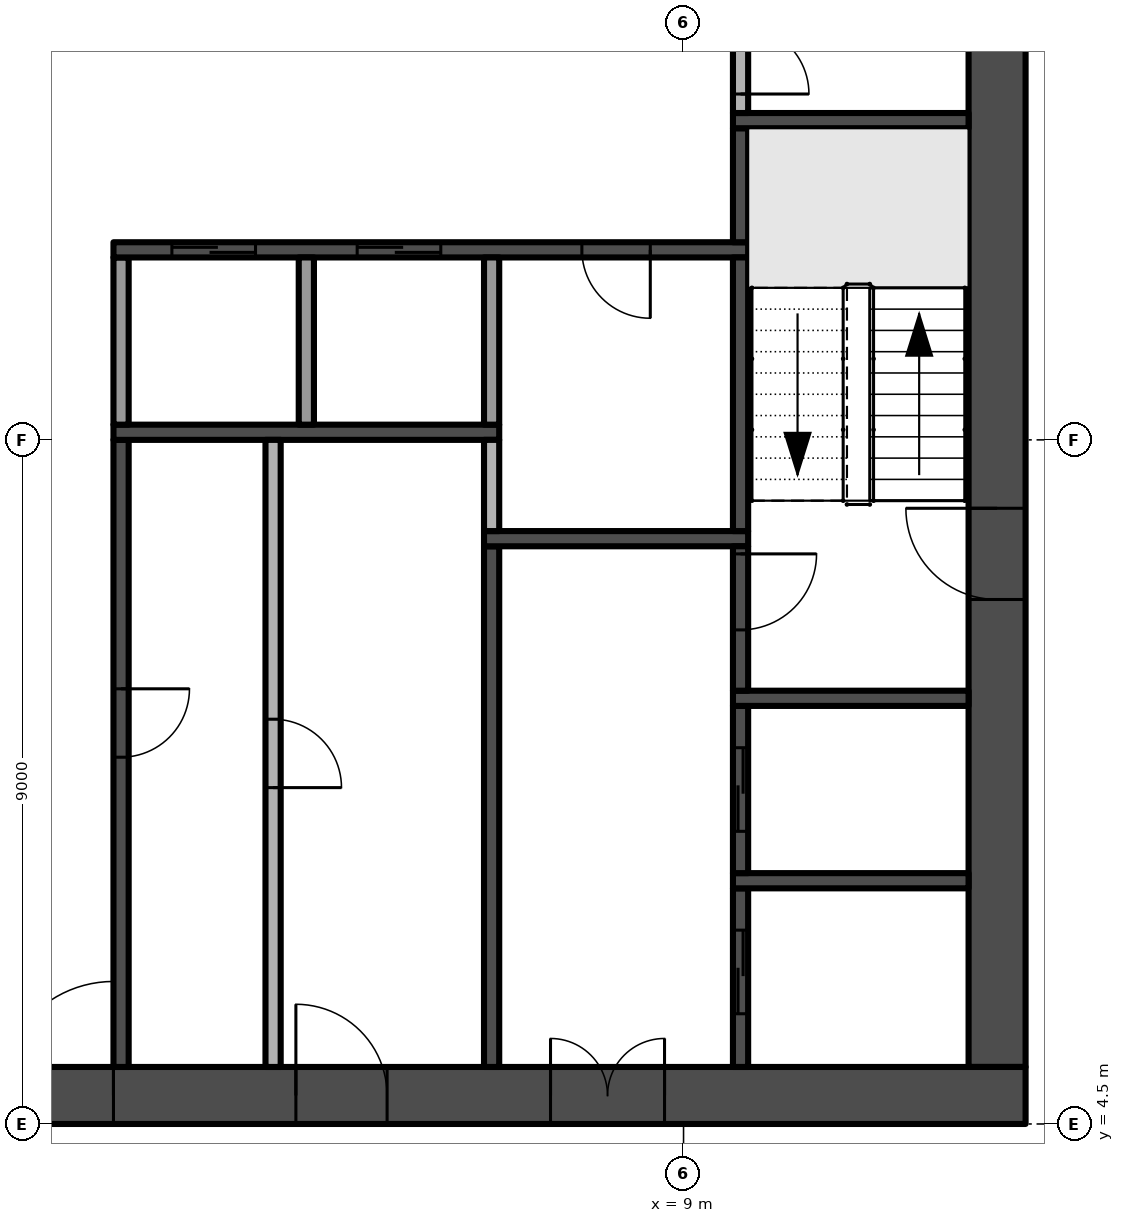
"""IFC4 building model, lengths in metres.
Left out: names, types, materials, properties, quantities, classifications, styles, units other than length and angle.
Written with IfcOpenShell. Run it as: python <this file> out.ifc"""

import sys

from ifc_helpers import new_model, si_unit, direction, frame, frame_2d, origin, place, context, subcontext, project, spatial, rectangle, extrude, element, fill, save


model = new_model("IFC4")
c1 = context("Model", 3, precision=1e-05, world=origin(), true_north=direction((0.0, 1.0)))
c2 = subcontext(c1, "Body", "Model", "MODEL_VIEW")
j1 = project(units=[si_unit("LENGTHUNIT", "METRE"), si_unit("PLANEANGLEUNIT", "RADIAN")], contexts=[c1])
p1 = place(None, origin())
s1 = spatial("IfcSite", under=j1, at=p1, CompositionType="ELEMENT")
p2 = place(p1, origin())
s2 = spatial("IfcBuilding", under=s1, at=p2, CompositionType="ELEMENT")
p3 = place(p2, frame((0.0, 0.0, 159.2)))
s3 = spatial("IfcBuildingStorey", under=s2, at=p3, CompositionType="ELEMENT", Elevation=159.2)
p4 = place(p3, frame((-13.5, 4.875, -0.3), z_axis=(0.0, 0.0, 1.0), x_axis=(1.0, 0.0, 0.0)))
e1 = element("IfcWall", 1, at=p4, inside=s3, PredefinedType="SHEAR", context=c2, shape_type="SweptSolid", body=[
    extrude(rectangle(XDim=27.0, YDim=0.75, at=frame_2d((13.5, 0.0))), origin(), (0.0, 0.0, 1.0), 3.8),
])
p5 = place(p4, frame((12.0, 0.0, 0.3)))
e2 = element("IfcOpeningElement", 2, at=p5, cuts=e1, PredefinedType="OPENING", context=c2, shape_type="SweptSolid", body=[
    extrude(rectangle(XDim=3.0, YDim=2.4, at=frame_2d((1.5, 1.2))), frame((0.0, 0.385, 0.0), z_axis=(0.0, -1.0, 0.0), x_axis=(1.0, 0.0, 0.0)), (0.0, 0.0, 1.0), 0.77),
])
p6 = place(p4, frame((4.9, 0.0, 0.3)))
e3 = element("IfcOpeningElement", 3, at=p6, cuts=e1, PredefinedType="OPENING", context=c2, shape_type="SweptSolid", body=[
    extrude(rectangle(XDim=1.2, YDim=2.2, at=frame_2d((0.6, 1.1))), frame((0.0, 0.385, 0.0), z_axis=(0.0, -1.0, 0.0), x_axis=(1.0, 0.0, 0.0)), (0.0, 0.0, 1.0), 0.77),
])
p7 = place(p4, frame((20.75, 0.0, 0.3)))
e4 = element("IfcOpeningElement", 4, at=p7, cuts=e1, PredefinedType="OPENING", context=c2, shape_type="SweptSolid", body=[
    extrude(rectangle(XDim=1.5, YDim=2.2, at=frame_2d((0.75, 1.1))), frame((0.0, 0.385, 0.0), z_axis=(0.0, -1.0, 0.0), x_axis=(1.0, 0.0, 0.0)), (0.0, 0.0, 1.0), 0.77),
])
p8 = place(p4, frame((17.4, 0.0, 0.3)))
e5 = element("IfcOpeningElement", 5, at=p8, cuts=e1, PredefinedType="OPENING", context=c2, shape_type="SweptSolid", body=[
    extrude(rectangle(XDim=1.2, YDim=2.2, at=frame_2d((0.6, 1.1))), frame((0.0, 0.385, 0.0), z_axis=(0.0, -1.0, 0.0), x_axis=(1.0, 0.0, 0.0)), (0.0, 0.0, 1.0), 0.77),
])
p9 = place(p3, frame((13.125, 5.25, -0.3), z_axis=(0.0, 0.0, 1.0), x_axis=(0.0, 1.0, 0.0)))
e6 = element("IfcWall", 6, at=p9, inside=s3, PredefinedType="SHEAR", context=c2, shape_type="SweptSolid", body=[
    extrude(rectangle(XDim=16.5, YDim=0.75, at=frame_2d((8.25, 0.0))), origin(), (0.0, 0.0, 1.0), 3.8),
])
p10 = place(p9, frame((6.15, 0.0, 0.3)))
e7 = element("IfcOpeningElement", 7, at=p10, cuts=e6, PredefinedType="OPENING", context=c2, shape_type="SweptSolid", body=[
    extrude(rectangle(XDim=1.2, YDim=2.2, at=frame_2d((0.6, 1.1))), frame((0.0, 0.385, 0.0), z_axis=(0.0, -1.0, 0.0), x_axis=(1.0, 0.0, 0.0)), (0.0, 0.0, 1.0), 0.77),
])
p11 = place(p3, frame((1.6, 13.5, 0.0), z_axis=(0.0, 0.0, 1.0), x_axis=(0.0, -1.0, 0.0)))
e8 = element("IfcWall", 8, at=p11, inside=s3, PredefinedType="SHEAR", context=c2, shape_type="SweptSolid", body=[
    extrude(rectangle(XDim=8.25, YDim=0.2, at=frame_2d((4.125, 0.0))), origin(), (0.0, 0.0, 1.0), 3.5),
])
p12 = place(p11, frame((3.275, 0.0, 0.0)))
e9 = element("IfcOpeningElement", 9, at=p12, cuts=e8, PredefinedType="OPENING", context=c2, shape_type="SweptSolid", body=[
    extrude(rectangle(XDim=0.9, YDim=2.1, at=frame_2d((0.45, 1.05))), frame((0.0, 0.11, 0.0), z_axis=(0.0, -1.0, 0.0), x_axis=(1.0, 0.0, 0.0)), (0.0, 0.0, 1.0), 0.22),
])
p13 = place(p3, frame((1.5, 13.6, 0.0), z_axis=(0.0, 0.0, 1.0), x_axis=(1.0, 0.0, 0.0)))
e10 = element("IfcWall", 10, at=p13, inside=s3, PredefinedType="SHEAR", context=c2, shape_type="SweptSolid", body=[
    extrude(rectangle(XDim=5.075, YDim=0.2, at=frame_2d((2.538, 0.0))), origin(), (0.0, 0.0, 1.0), 3.5),
])
p14 = place(p3, frame((1.6, 13.7, 0.0), z_axis=(0.0, 0.0, 1.0), x_axis=(0.0, 1.0, 0.0)))
e11 = element("IfcWall", 11, at=p14, inside=s3, PredefinedType="PARTITIONING", context=c2, shape_type="SweptSolid", body=[
    extrude(rectangle(XDim=2.2, YDim=0.2, at=frame_2d((1.1, 0.0))), origin(), (0.0, 0.0, 1.0), 3.5),
])
p15 = place(p3, frame((9.85, 16.0, 0.0), z_axis=(0.0, 0.0, 1.0), x_axis=(-1.0, 0.0, 0.0)))
e12 = element("IfcWall", 12, at=p15, inside=s3, PredefinedType="SHEAR", context=c2, shape_type="SweptSolid", body=[
    extrude(rectangle(XDim=8.35, YDim=0.2, at=frame_2d((4.175, 0.0))), origin(), (0.0, 0.0, 1.0), 3.5),
])
p16 = place(p15, frame((6.481, 0.0, 0.0)))
e13 = element("IfcOpeningElement", 13, at=p16, cuts=e12, PredefinedType="OPENING", context=c2, shape_type="SweptSolid", body=[
    extrude(rectangle(XDim=1.1, YDim=2.1, at=frame_2d((0.55, 1.05))), frame((0.0, 0.11, 0.0), z_axis=(0.0, -1.0, 0.0), x_axis=(1.0, 0.0, 0.0)), (0.0, 0.0, 1.0), 0.22),
])
p17 = place(p15, frame((4.044, 0.0, 0.0)))
e14 = element("IfcOpeningElement", 14, at=p17, cuts=e12, PredefinedType="OPENING", context=c2, shape_type="SweptSolid", body=[
    extrude(rectangle(XDim=1.1, YDim=2.1, at=frame_2d((0.55, 1.05))), frame((0.0, 0.11, 0.0), z_axis=(0.0, -1.0, 0.0), x_axis=(1.0, 0.0, 0.0)), (0.0, 0.0, 1.0), 0.22),
])
p18 = place(p15, frame((1.288, 0.0, 0.0)))
e15 = element("IfcOpeningElement", 15, at=p18, cuts=e12, PredefinedType="OPENING", context=c2, shape_type="SweptSolid", body=[
    extrude(rectangle(XDim=0.9, YDim=2.1, at=frame_2d((0.45, 1.05))), frame((0.0, 0.11, 0.0), z_axis=(0.0, -1.0, 0.0), x_axis=(1.0, 0.0, 0.0)), (0.0, 0.0, 1.0), 0.22),
])
p19 = place(p3, frame((3.6, 13.5, 0.0), z_axis=(0.0, 0.0, 1.0), x_axis=(0.0, -1.0, 0.0)))
e16 = element("IfcWall", 16, at=p19, inside=s3, PredefinedType="PARTITIONING", context=c2, shape_type="SweptSolid", body=[
    extrude(rectangle(XDim=8.25, YDim=0.2, at=frame_2d((4.125, 0.0))), origin(), (0.0, 0.0, 1.0), 3.5),
])
p20 = place(p19, frame((3.675, 0.0, 0.0)))
e17 = element("IfcOpeningElement", 17, at=p20, cuts=e16, PredefinedType="OPENING", context=c2, shape_type="SweptSolid", body=[
    extrude(rectangle(XDim=0.9, YDim=2.1, at=frame_2d((0.45, 1.05))), frame((0.0, 0.11, 0.0), z_axis=(0.0, -1.0, 0.0), x_axis=(1.0, 0.0, 0.0)), (0.0, 0.0, 1.0), 0.22),
])
p21 = place(p3, frame((4.037, 13.7, 0.0), z_axis=(0.0, 0.0, 1.0), x_axis=(0.0, 1.0, 0.0)))
e18 = element("IfcWall", 18, at=p21, inside=s3, PredefinedType="PARTITIONING", context=c2, shape_type="SweptSolid", body=[
    extrude(rectangle(XDim=2.2, YDim=0.2, at=frame_2d((1.1, 0.0))), origin(), (0.0, 0.0, 1.0), 3.5),
])
p22 = place(p3, frame((6.475, 5.25, 0.0), z_axis=(0.0, 0.0, 1.0), x_axis=(0.0, 1.0, 0.0)))
e19 = element("IfcWall", 19, at=p22, inside=s3, PredefinedType="SHEAR", context=c2, shape_type="SweptSolid", body=[
    extrude(rectangle(XDim=6.85, YDim=0.2, at=frame_2d((3.425, 0.0))), origin(), (0.0, 0.0, 1.0), 3.5),
])
p23 = place(p3, frame((6.375, 12.2, 0.0), z_axis=(0.0, 0.0, 1.0), x_axis=(1.0, 0.0, 0.0)))
e20 = element("IfcWall", 20, at=p23, inside=s3, PredefinedType="SHEAR", context=c2, shape_type="SweptSolid", body=[
    extrude(rectangle(XDim=3.475, YDim=0.2, at=frame_2d((1.738, 0.0))), origin(), (0.0, 0.0, 1.0), 3.5),
])
p24 = place(p3, frame((6.475, 12.3, 0.0), z_axis=(0.0, 0.0, 1.0), x_axis=(0.0, 1.0, 0.0)))
e21 = element("IfcWall", 21, at=p24, inside=s3, PredefinedType="PARTITIONING", context=c2, shape_type="SweptSolid", body=[
    extrude(rectangle(XDim=1.2, YDim=0.2, at=frame_2d((0.6, 0.0))), origin(), (0.0, 0.0, 1.0), 3.5),
])
p25 = place(p3, frame((6.475, 13.7, 0.0), z_axis=(0.0, 0.0, 1.0), x_axis=(0.0, 1.0, 0.0)))
e22 = element("IfcWall", 22, at=p25, inside=s3, PredefinedType="PARTITIONING", context=c2, shape_type="SweptSolid", body=[
    extrude(rectangle(XDim=2.2, YDim=0.2, at=frame_2d((1.1, 0.0))), origin(), (0.0, 0.0, 1.0), 3.5),
])
p26 = place(p3, frame((9.75, 5.25, 0.0), z_axis=(0.0, 0.0, 1.0), x_axis=(0.0, 1.0, 0.0)))
e23 = element("IfcWall", 23, at=p26, inside=s3, PredefinedType="SHEAR", context=c2, shape_type="SweptSolid", body=[
    extrude(rectangle(XDim=2.35, YDim=0.2, at=frame_2d((1.175, 0.0))), origin(), (0.0, 0.0, 1.0), 3.5),
])
p27 = place(p26, frame((0.7, 0.0, 0.0)))
e24 = element("IfcOpeningElement", 24, at=p27, cuts=e23, PredefinedType="OPENING", context=c2, shape_type="SweptSolid", body=[
    extrude(rectangle(XDim=1.1, YDim=2.1, at=frame_2d((0.55, 1.05))), frame((0.0, 0.11, 0.0), z_axis=(0.0, -1.0, 0.0), x_axis=(1.0, 0.0, 0.0)), (0.0, 0.0, 1.0), 0.22),
])
p28 = place(p3, frame((9.65, 7.7, 0.0), z_axis=(0.0, 0.0, 1.0), x_axis=(1.0, 0.0, 0.0)))
e25 = element("IfcWall", 25, at=p28, inside=s3, PredefinedType="SHEAR", context=c2, shape_type="SweptSolid", body=[
    extrude(rectangle(XDim=3.1, YDim=0.2, at=frame_2d((1.55, 0.0))), origin(), (0.0, 0.0, 1.0), 3.5),
])
p29 = place(p3, frame((9.75, 7.8, 0.0), z_axis=(0.0, 0.0, 1.0), x_axis=(0.0, 1.0, 0.0)))
e26 = element("IfcWall", 26, at=p29, inside=s3, PredefinedType="SHEAR", context=c2, shape_type="SweptSolid", body=[
    extrude(rectangle(XDim=2.2, YDim=0.2, at=frame_2d((1.1, 0.0))), origin(), (0.0, 0.0, 1.0), 3.5),
])
p30 = place(p29, frame((0.55, 0.0, 0.0)))
e27 = element("IfcOpeningElement", 27, at=p30, cuts=e26, PredefinedType="OPENING", context=c2, shape_type="SweptSolid", body=[
    extrude(rectangle(XDim=1.1, YDim=2.1, at=frame_2d((0.55, 1.05))), frame((0.0, 0.11, 0.0), z_axis=(0.0, -1.0, 0.0), x_axis=(1.0, 0.0, 0.0)), (0.0, 0.0, 1.0), 0.22),
])
p31 = place(p3, frame((9.65, 10.1, 0.0), z_axis=(0.0, 0.0, 1.0), x_axis=(1.0, 0.0, 0.0)))
e28 = element("IfcWall", 28, at=p31, inside=s3, PredefinedType="SHEAR", context=c2, shape_type="SweptSolid", body=[
    extrude(rectangle(XDim=3.1, YDim=0.2, at=frame_2d((1.55, 0.0))), origin(), (0.0, 0.0, 1.0), 3.5),
])
p32 = place(p3, frame((9.75, 12.1, 0.0), z_axis=(0.0, 0.0, 1.0), x_axis=(0.0, -1.0, 0.0)))
e29 = element("IfcWall", 29, at=p32, inside=s3, PredefinedType="SHEAR", context=c2, shape_type="SweptSolid", body=[
    extrude(rectangle(XDim=1.9, YDim=0.2, at=frame_2d((0.95, 0.0))), origin(), (0.0, 0.0, 1.0), 3.5),
])
p33 = place(p32, frame((0.1, 0.0, 0.0)))
e30 = element("IfcOpeningElement", 30, at=p33, cuts=e29, PredefinedType="OPENING", context=c2, shape_type="SweptSolid", body=[
    extrude(rectangle(XDim=1.0, YDim=2.2, at=frame_2d((0.5, 1.1))), frame((0.0, 0.11, 0.0), z_axis=(0.0, -1.0, 0.0), x_axis=(1.0, 0.0, 0.0)), (0.0, 0.0, 1.0), 0.22),
])
p34 = place(p3, frame((9.75, 12.3, 0.0), z_axis=(0.0, 0.0, 1.0), x_axis=(0.0, 1.0, 0.0)))
e31 = element("IfcWall", 31, at=p34, inside=s3, PredefinedType="SHEAR", context=c2, shape_type="SweptSolid", body=[
    extrude(rectangle(XDim=3.6, YDim=0.2, at=frame_2d((1.8, 0.0))), origin(), (0.0, 0.0, 1.0), 3.5),
])
p35 = place(p3, frame((9.75, 16.1, 0.0), z_axis=(0.0, 0.0, 1.0), x_axis=(0.0, 1.0, 0.0)))
e32 = element("IfcWall", 32, at=p35, inside=s3, PredefinedType="SHEAR", context=c2, shape_type="SweptSolid", body=[
    extrude(rectangle(XDim=1.5, YDim=0.2, at=frame_2d((0.75, 0.0))), origin(), (0.0, 0.0, 1.0), 3.5),
])
p36 = place(p3, frame((9.65, 17.7, 0.0), z_axis=(0.0, 0.0, 1.0), x_axis=(1.0, 0.0, 0.0)))
e33 = element("IfcWall", 33, at=p36, inside=s3, PredefinedType="SHEAR", context=c2, shape_type="SweptSolid", body=[
    extrude(rectangle(XDim=3.1, YDim=0.2, at=frame_2d((1.55, 0.0))), origin(), (0.0, 0.0, 1.0), 3.5),
])
p37 = place(p3, frame((9.75, 19.2, 0.0), z_axis=(0.0, 0.0, 1.0), x_axis=(0.0, -1.0, 0.0)))
e34 = element("IfcWall", 34, at=p37, inside=s3, PredefinedType="PARTITIONING", context=c2, shape_type="SweptSolid", body=[
    extrude(rectangle(XDim=1.4, YDim=0.2, at=frame_2d((0.7, 0.0))), origin(), (0.0, 0.0, 1.0), 3.5),
])
p38 = place(p37, frame((0.25, 0.0, 0.0)))
e35 = element("IfcOpeningElement", 35, at=p38, cuts=e34, PredefinedType="OPENING", context=c2, shape_type="SweptSolid", body=[
    extrude(rectangle(XDim=0.9, YDim=2.1, at=frame_2d((0.45, 1.05))), frame((0.0, 0.11, 0.0), z_axis=(0.0, -1.0, 0.0), x_axis=(1.0, 0.0, 0.0)), (0.0, 0.0, 1.0), 0.22),
])
p39 = place(p5, frame((3.0, 0.0, 0.0), z_axis=(0.0, 0.0, 1.0), x_axis=(-1.0, 0.0, 0.0)))
e36 = element("IfcDoor", 36, at=p39, inside=s3, OperationType="DOUBLE_DOOR_SINGLE_SWING", PredefinedType="DOOR", context=c2, shape_type="SweptSolid", body=[
    extrude(rectangle(XDim=3.0, YDim=2.4, at=frame_2d((1.5, 1.2))), frame((0.0, 0.025, 0.0), z_axis=(0.0, -1.0, 0.0), x_axis=(1.0, 0.0, 0.0)), (0.0, 0.0, 1.0), 0.05),
])
fill(e2, e36)
p40 = place(p10, frame((1.2, 0.0, 0.0), z_axis=(0.0, 0.0, 1.0), x_axis=(-1.0, 0.0, 0.0)))
e37 = element("IfcDoor", 37, at=p40, inside=s3, OperationType="SINGLE_SWING_LEFT", PredefinedType="DOOR", context=c2, shape_type="SweptSolid", body=[
    extrude(rectangle(XDim=1.2, YDim=2.2, at=frame_2d((0.6, 1.1))), frame((0.0, 0.025, 0.0), z_axis=(0.0, -1.0, 0.0), x_axis=(1.0, 0.0, 0.0)), (0.0, 0.0, 1.0), 0.05),
])
fill(e7, e37)
p41 = place(p7, frame((1.5, 0.0, 0.0), z_axis=(0.0, 0.0, 1.0), x_axis=(-1.0, 0.0, 0.0)))
e38 = element("IfcDoor", 38, at=p41, inside=s3, OperationType="DOUBLE_DOOR_SINGLE_SWING", PredefinedType="DOOR", context=c2, shape_type="SweptSolid", body=[
    extrude(rectangle(XDim=1.5, YDim=2.2, at=frame_2d((0.75, 1.1))), frame((0.0, 0.025, 0.0), z_axis=(0.0, -1.0, 0.0), x_axis=(1.0, 0.0, 0.0)), (0.0, 0.0, 1.0), 0.05),
])
fill(e4, e38)
p42 = place(p8, frame((1.2, 0.0, 0.0), z_axis=(0.0, 0.0, 1.0), x_axis=(-1.0, 0.0, 0.0)))
e39 = element("IfcDoor", 39, at=p42, inside=s3, OperationType="SINGLE_SWING_RIGHT", PredefinedType="DOOR", context=c2, shape_type="SweptSolid", body=[
    extrude(rectangle(XDim=1.2, YDim=2.2, at=frame_2d((0.6, 1.1))), frame((0.0, 0.025, 0.0), z_axis=(0.0, -1.0, 0.0), x_axis=(1.0, 0.0, 0.0)), (0.0, 0.0, 1.0), 0.05),
])
fill(e5, e39)
p43 = place(p33, origin())
e40 = element("IfcDoor", 40, at=p43, inside=s3, OperationType="SINGLE_SWING_LEFT", PredefinedType="DOOR", context=c2, shape_type="SweptSolid", body=[
    extrude(rectangle(XDim=1.0, YDim=2.2, at=frame_2d((0.5, 1.1))), frame((0.0, 0.025, 0.0), z_axis=(0.0, -1.0, 0.0), x_axis=(1.0, 0.0, 0.0)), (0.0, 0.0, 1.0), 0.05),
])
fill(e30, e40)
p44 = place(p16, origin())
e41 = element("IfcDoor", 41, at=p44, inside=s3, OperationType="SLIDING_TO_RIGHT", PredefinedType="DOOR", context=c2, shape_type="SweptSolid", body=[
    extrude(rectangle(XDim=1.1, YDim=2.1, at=frame_2d((0.55, 1.05))), frame((0.0, 0.025, 0.0), z_axis=(0.0, -1.0, 0.0), x_axis=(1.0, 0.0, 0.0)), (0.0, 0.0, 1.0), 0.05),
])
fill(e13, e41)
p45 = place(p17, origin())
e42 = element("IfcDoor", 42, at=p45, inside=s3, OperationType="SLIDING_TO_RIGHT", PredefinedType="DOOR", context=c2, shape_type="SweptSolid", body=[
    extrude(rectangle(XDim=1.1, YDim=2.1, at=frame_2d((0.55, 1.05))), frame((0.0, 0.025, 0.0), z_axis=(0.0, -1.0, 0.0), x_axis=(1.0, 0.0, 0.0)), (0.0, 0.0, 1.0), 0.05),
])
fill(e14, e42)
p46 = place(p27, origin())
e43 = element("IfcDoor", 43, at=p46, inside=s3, OperationType="SLIDING_TO_RIGHT", PredefinedType="DOOR", context=c2, shape_type="SweptSolid", body=[
    extrude(rectangle(XDim=1.1, YDim=2.1, at=frame_2d((0.55, 1.05))), frame((0.0, 0.025, 0.0), z_axis=(0.0, -1.0, 0.0), x_axis=(1.0, 0.0, 0.0)), (0.0, 0.0, 1.0), 0.05),
])
fill(e24, e43)
p47 = place(p30, origin())
e44 = element("IfcDoor", 44, at=p47, inside=s3, OperationType="SLIDING_TO_RIGHT", PredefinedType="DOOR", context=c2, shape_type="SweptSolid", body=[
    extrude(rectangle(XDim=1.1, YDim=2.1, at=frame_2d((0.55, 1.05))), frame((0.0, 0.025, 0.0), z_axis=(0.0, -1.0, 0.0), x_axis=(1.0, 0.0, 0.0)), (0.0, 0.0, 1.0), 0.05),
])
fill(e27, e44)
p48 = place(p12, origin())
e45 = element("IfcDoor", 45, at=p48, inside=s3, OperationType="SINGLE_SWING_LEFT", PredefinedType="DOOR", context=c2, shape_type="SweptSolid", body=[
    extrude(rectangle(XDim=0.9, YDim=2.1, at=frame_2d((0.45, 1.05))), frame((0.0, 0.025, 0.0), z_axis=(0.0, -1.0, 0.0), x_axis=(1.0, 0.0, 0.0)), (0.0, 0.0, 1.0), 0.05),
])
fill(e9, e45)
p49 = place(p18, origin())
e46 = element("IfcDoor", 46, at=p49, inside=s3, OperationType="SINGLE_SWING_LEFT", PredefinedType="DOOR", context=c2, shape_type="SweptSolid", body=[
    extrude(rectangle(XDim=0.9, YDim=2.1, at=frame_2d((0.45, 1.05))), frame((0.0, 0.025, 0.0), z_axis=(0.0, -1.0, 0.0), x_axis=(1.0, 0.0, 0.0)), (0.0, 0.0, 1.0), 0.05),
])
fill(e15, e46)
p50 = place(p38, origin())
e47 = element("IfcDoor", 47, at=p50, inside=s3, OperationType="SINGLE_SWING_RIGHT", PredefinedType="DOOR", context=c2, shape_type="SweptSolid", body=[
    extrude(rectangle(XDim=0.9, YDim=2.1, at=frame_2d((0.45, 1.05))), frame((0.0, 0.025, 0.0), z_axis=(0.0, -1.0, 0.0), x_axis=(1.0, 0.0, 0.0)), (0.0, 0.0, 1.0), 0.05),
])
fill(e35, e47)
p51 = place(p20, origin())
e48 = element("IfcDoor", 48, at=p51, inside=s3, OperationType="SINGLE_SWING_RIGHT", PredefinedType="DOOR", context=c2, shape_type="SweptSolid", body=[
    extrude(rectangle(XDim=0.9, YDim=2.1, at=frame_2d((0.45, 1.05))), frame((0.0, 0.025, 0.0), z_axis=(0.0, -1.0, 0.0), x_axis=(1.0, 0.0, 0.0)), (0.0, 0.0, 1.0), 0.05),
])
fill(e17, e48)
save(model, sys.argv[1])
